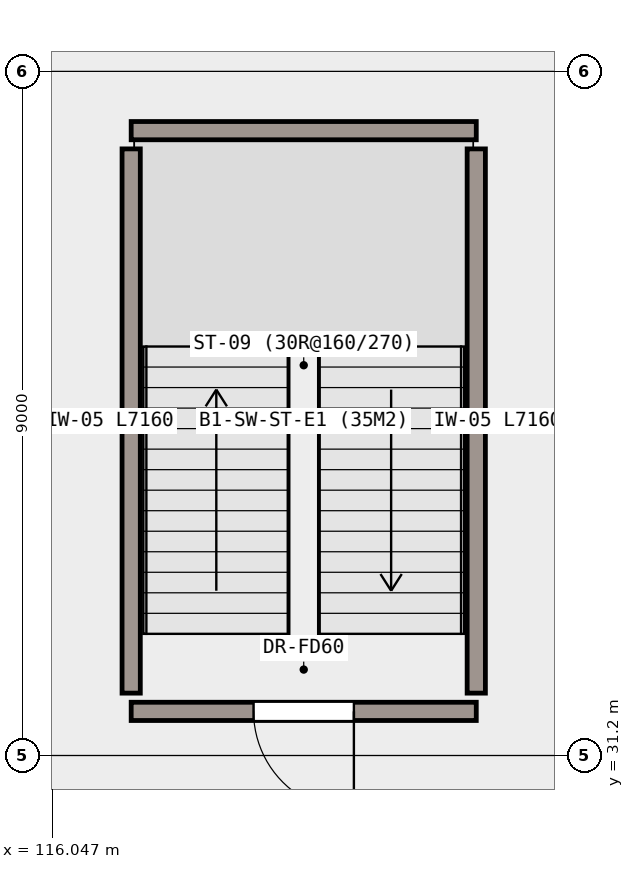
"""IFC4 building model, lengths in metres.
Left out: names, types, materials, properties, quantities, classifications, styles, units other than length and angle.
Written with IfcOpenShell. Run it as: python <this file> out.ifc"""

import sys

from ifc_helpers import new_model, si_unit, direction, frame, frame_2d, origin, place, context, subcontext, project, spatial, rectangle, extrude, element, fill, save


model = new_model("IFC4")
c1 = context("Model", 3, precision=1e-05, world=origin(), true_north=direction((0.0, 1.0)))
c2 = subcontext(c1, "Body", "Model", "MODEL_VIEW")
j1 = project(units=[si_unit("LENGTHUNIT", "METRE"), si_unit("PLANEANGLEUNIT", "RADIAN")], contexts=[c1])
p1 = place(None, origin())
s1 = spatial("IfcSite", under=j1, at=p1, CompositionType="ELEMENT")
p2 = place(p1, origin())
s2 = spatial("IfcBuilding", under=s1, at=p2, CompositionType="ELEMENT")
p3 = place(p2, frame((0.0, 0.0, -4.8)))
s3 = spatial("IfcBuildingStorey", under=s2, at=p3, CompositionType="ELEMENT", Elevation=-4.8)
p4 = place(p3, frame((121.62, 31.78, 0.0), z_axis=(0.0, 0.0, 1.0), x_axis=(-1.0, 0.0, 0.0)))
e1 = element("IfcWall", 1, at=p4, inside=s3, PredefinedType="SHEAR", context=c2, shape_type="SweptSolid", body=[
    extrude(rectangle(XDim=4.54, YDim=0.24, at=frame_2d((2.27, 0.0))), origin(), (0.0, 0.0, 1.0), 4.48),
])
p5 = place(p4, frame((1.61, 0.0, 0.0)))
e2 = element("IfcOpeningElement", 2, at=p5, cuts=e1, PredefinedType="OPENING", context=c2, shape_type="SweptSolid", body=[
    extrude(rectangle(XDim=1.32, YDim=2.15, at=frame_2d((0.66, 1.075))), frame((0.0, 0.13, 0.0), z_axis=(0.0, -1.0, 0.0), x_axis=(1.0, 0.0, 0.0)), (0.0, 0.0, 1.0), 0.26),
])
p6 = place(p3, frame((117.08, 39.42, 0.0), z_axis=(0.0, 0.0, 1.0), x_axis=(1.0, 0.0, 0.0)))
e3 = element("IfcWall", 3, at=p6, inside=s3, PredefinedType="SHEAR", context=c2, shape_type="SweptSolid", body=[
    extrude(rectangle(XDim=4.54, YDim=0.24, at=frame_2d((2.27, 0.0))), origin(), (0.0, 0.0, 1.0), 4.48),
])
for number, where, z_axis, x_axis in (
    (4, (117.08, 32.02, 0.0), (0.0, 0.0, 1.0), (0.0, 1.0, 0.0)),
    (5, (121.62, 39.18, 0.0), (0.0, 0.0, 1.0), (0.0, -1.0, 0.0)),
):
    element("IfcWall", number, at=place(p3, frame(where, z_axis=z_axis, x_axis=x_axis)), inside=s3, PredefinedType="SHEAR", context=c2, shape_type="SweptSolid", body=[
        extrude(rectangle(XDim=7.16, YDim=0.24, at=frame_2d((3.58, 0.0))), origin(), (0.0, 0.0, 1.0), 4.48),
    ])
p7 = place(p5, origin())
e6 = element("IfcDoor", 6, at=p7, inside=s3, OperationType="SINGLE_SWING_LEFT", PredefinedType="DOOR", context=c2, shape_type="SweptSolid", body=[
    extrude(rectangle(XDim=1.32, YDim=2.15, at=frame_2d((0.66, 1.075))), frame((0.0, 0.025, 0.0), z_axis=(0.0, -1.0, 0.0), x_axis=(1.0, 0.0, 0.0)), (0.0, 0.0, 1.0), 0.05),
])
fill(e2, e6)
save(model, sys.argv[1])
